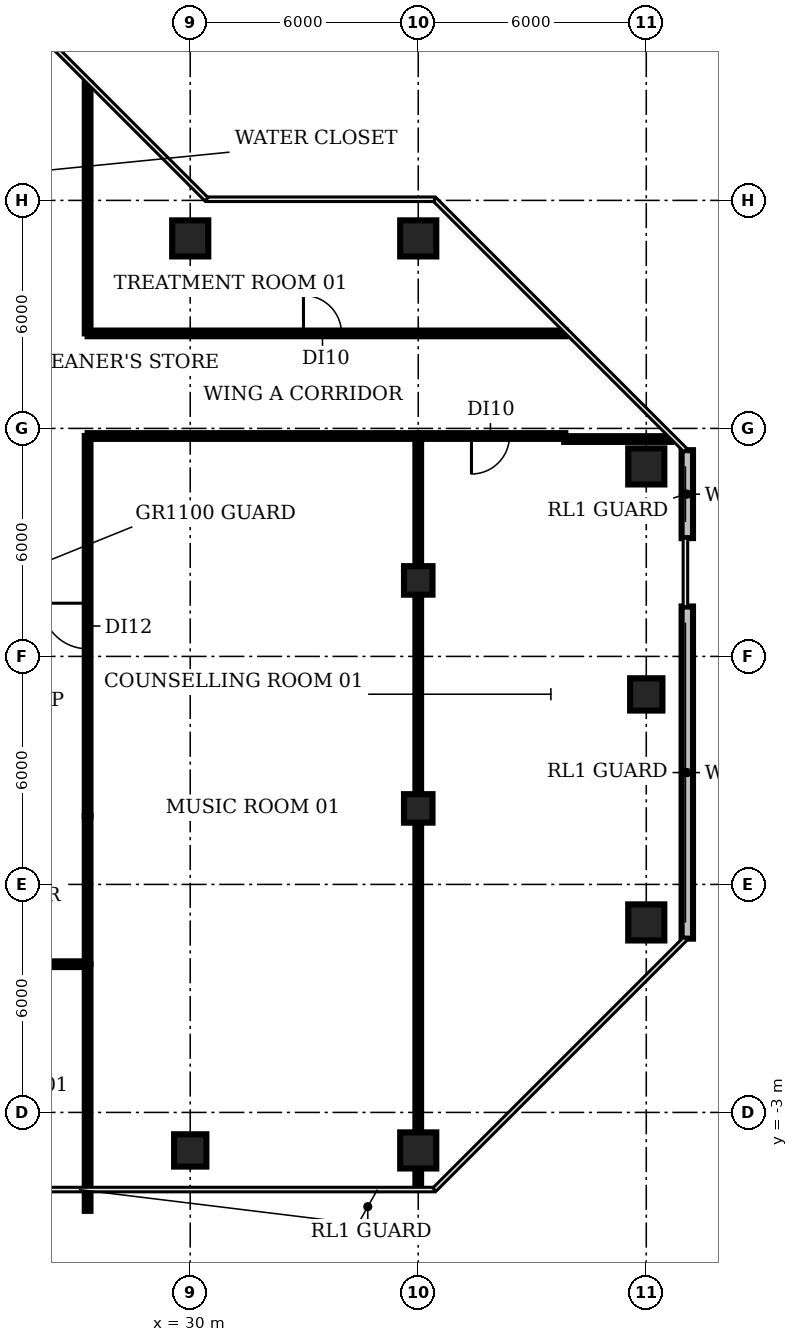
"""IFC4 building model, lengths in metres.
Left out: names, types, materials, properties, quantities, classifications, styles, units other than length and angle.
Written with IfcOpenShell. Run it as: python <this file> out.ifc"""

import sys

from ifc_helpers import new_model, si_unit, direction, frame, frame_2d, origin, origin_2d, place, context, subcontext, project, spatial, rectangle, circle, extrude, element, fill, save


model = new_model("IFC4")
c1 = context("Model", 3, precision=1e-05, world=origin(), true_north=direction((0.0, 1.0)))
c2 = subcontext(c1, "Body", "Model", "MODEL_VIEW")
j1 = project(units=[si_unit("LENGTHUNIT", "METRE"), si_unit("PLANEANGLEUNIT", "RADIAN")], contexts=[c1])
p1 = place(None, origin())
s1 = spatial("IfcSite", under=j1, at=p1, CompositionType="ELEMENT")
p2 = place(p1, origin())
s2 = spatial("IfcBuilding", under=s1, at=p2, CompositionType="ELEMENT")
p3 = place(p2, frame((0.0, 0.0, 155.0)))
s3 = spatial("IfcBuildingStorey", under=s2, at=p3, CompositionType="ELEMENT", Elevation=155.0)
p4 = place(p3, frame((30.0, -4.0, 0.0), z_axis=(0.0, 0.0, 1.0), x_axis=(1.0, 0.0, 0.0)))
e1 = element("IfcColumn", 1, at=p4, inside=s3, PredefinedType="COLUMN", context=c2, shape_type="SweptSolid", body=[
    extrude(rectangle(XDim=0.85, YDim=0.85, at=origin_2d()), origin(), (0.0, 0.0, 1.0), 3.85),
])
for number, where, z_axis, x_axis in (
    (2, (30.0, 20.0, 0.0), (0.0, 0.0, 1.0), (1.0, 0.0, 0.0)),
    (3, (36.0, -4.0, 0.0), (0.0, 0.0, 1.0), (1.0, 0.0, 0.0)),
):
    element("IfcColumn", number, at=place(p3, frame(where, z_axis=z_axis, x_axis=x_axis)), inside=s3, PredefinedType="COLUMN", context=c2, shape_type="SweptSolid", body=[
        extrude(circle(Radius=0.475, at=origin_2d()), origin(), (0.0, 0.0, 1.0), 3.85),
    ])
for number, where, z_axis, x_axis in (
    (4, (36.0, 5.0, 0.0), (0.0, 0.0, 1.0), (1.0, 0.0, 0.0)),
    (5, (36.0, 11.0, 0.0), (0.0, 0.0, 1.0), (1.0, 0.0, 0.0)),
):
    element("IfcColumn", number, at=place(p3, frame(where, z_axis=z_axis, x_axis=x_axis)), inside=s3, PredefinedType="COLUMN", context=c2, shape_type="SweptSolid", body=[
        extrude(rectangle(XDim=0.75, YDim=0.75, at=origin_2d()), origin(), (0.0, 0.0, 1.0), 3.85),
    ])
for number, where, z_axis, x_axis in (
    (6, (36.0, 20.0, 0.0), (0.0, 0.0, 1.0), (1.0, 0.0, 0.0)),
    (7, (42.0, 2.0, 0.0), (0.0, 0.0, 1.0), (1.0, 0.0, 0.0)),
):
    element("IfcColumn", number, at=place(p3, frame(where, z_axis=z_axis, x_axis=x_axis)), inside=s3, PredefinedType="COLUMN", context=c2, shape_type="SweptSolid", body=[
        extrude(circle(Radius=0.475, at=origin_2d()), origin(), (0.0, 0.0, 1.0), 3.85),
    ])
p5 = place(p3, frame((42.0, 8.0, 0.0), z_axis=(0.0, 0.0, 1.0), x_axis=(1.0, 0.0, 0.0)))
e8 = element("IfcColumn", 8, at=p5, inside=s3, PredefinedType="COLUMN", context=c2, shape_type="SweptSolid", body=[
    extrude(rectangle(XDim=0.85, YDim=0.85, at=origin_2d()), origin(), (0.0, 0.0, 1.0), 3.85),
])
p6 = place(p3, frame((42.0, 14.0, 0.0), z_axis=(0.0, 0.0, 1.0), x_axis=(1.0, 0.0, 0.0)))
e9 = element("IfcColumn", 9, at=p6, inside=s3, PredefinedType="COLUMN", context=c2, shape_type="SweptSolid", body=[
    extrude(circle(Radius=0.475, at=origin_2d()), origin(), (0.0, 0.0, 1.0), 3.85),
])
p7 = place(p3, frame((43.08, 1.573, 0.0), z_axis=(0.0, 0.0, 1.0), x_axis=(0.0, 1.0, 0.0)))
e10 = element("IfcWall", 10, at=p7, inside=s3, PredefinedType="SOLIDWALL", context=c2, shape_type="SweptSolid", body=[
    extrude(rectangle(XDim=8.74, YDim=0.3, at=frame_2d((4.37, 0.0))), origin(), (0.0, 0.0, 1.0), 3.85),
])
p8 = place(p3, frame((43.08, 12.113, 0.0), z_axis=(0.0, 0.0, 1.0), x_axis=(0.0, 1.0, 0.0)))
e11 = element("IfcWall", 11, at=p8, inside=s3, PredefinedType="SOLIDWALL", context=c2, shape_type="SweptSolid", body=[
    extrude(rectangle(XDim=2.313, YDim=0.3, at=frame_2d((1.157, 0.0))), origin(), (0.0, 0.0, 1.0), 3.85),
])
p9 = place(p3, frame((27.3, -5.59, 0.0), z_axis=(0.0, 0.0, 1.0), x_axis=(0.0, 1.0, 0.0)))
e12 = element("IfcWall", 12, at=p9, inside=s3, PredefinedType="PARTITIONING", context=c2, shape_type="SweptSolid", body=[
    extrude(rectangle(XDim=6.49, YDim=0.15, at=frame_2d((3.245, 0.0))), origin(), (0.0, 0.0, 1.0), 2.88),
])
p10 = place(p3, frame((27.3, 0.9, 0.0), z_axis=(0.0, 0.0, 1.0), x_axis=(-1.0, 0.0, 0.0)))
e13 = element("IfcWall", 13, at=p10, inside=s3, PredefinedType="PARTITIONING", context=c2, shape_type="SweptSolid", body=[
    extrude(rectangle(XDim=24.6, YDim=0.15, at=frame_2d((12.3, 0.0))), origin(), (0.0, 0.0, 1.0), 2.88),
])
p11 = place(p10, frame((11.8, 0.0, 0.0)))
e14 = element("IfcOpeningElement", 14, at=p11, cuts=e13, PredefinedType="OPENING", context=c2, shape_type="SweptSolid", body=[
    extrude(rectangle(XDim=1.2, YDim=2.1, at=frame_2d((0.6, 1.05))), frame((0.0, 0.085, 0.0), z_axis=(0.0, -1.0, 0.0), x_axis=(1.0, 0.0, 0.0)), (0.0, 0.0, 1.0), 0.17),
])
p12 = place(p3, frame((27.3, 0.9, 0.0), z_axis=(0.0, 0.0, 1.0), x_axis=(0.0, 1.0, 0.0)))
e15 = element("IfcWall", 15, at=p12, inside=s3, PredefinedType="PARTITIONING", context=c2, shape_type="SweptSolid", body=[
    extrude(rectangle(XDim=3.9, YDim=0.15, at=frame_2d((1.95, 0.0))), origin(), (0.0, 0.0, 1.0), 2.88),
])
p13 = place(p3, frame((27.3, 4.8, 0.0), z_axis=(0.0, 0.0, 1.0), x_axis=(0.0, 1.0, 0.0)))
e16 = element("IfcWall", 16, at=p13, inside=s3, PredefinedType="PARTITIONING", context=c2, shape_type="SweptSolid", body=[
    extrude(rectangle(XDim=10.0, YDim=0.15, at=frame_2d((5.0, 0.0))), origin(), (0.0, 0.0, 1.0), 2.88),
])
p14 = place(p13, frame((4.4, 0.0, 0.0)))
e17 = element("IfcOpeningElement", 17, at=p14, cuts=e16, PredefinedType="OPENING", context=c2, shape_type="SweptSolid", body=[
    extrude(rectangle(XDim=1.2, YDim=2.1, at=frame_2d((0.6, 1.05))), frame((0.0, 0.085, 0.0), z_axis=(0.0, -1.0, 0.0), x_axis=(1.0, 0.0, 0.0)), (0.0, 0.0, 1.0), 0.17),
])
p15 = place(p3, frame((27.3, 14.8, 0.0), z_axis=(0.0, 0.0, 1.0), x_axis=(1.0, 0.0, 0.0)))
e18 = element("IfcWall", 18, at=p15, inside=s3, PredefinedType="PARTITIONING", context=c2, shape_type="SweptSolid", body=[
    extrude(rectangle(XDim=8.7, YDim=0.15, at=frame_2d((4.35, 0.0))), origin(), (0.0, 0.0, 1.0), 2.88),
])
p16 = place(p3, frame((27.3, 17.5, 0.0), z_axis=(0.0, 0.0, 1.0), x_axis=(0.0, 1.0, 0.0)))
e19 = element("IfcWall", 19, at=p16, inside=s3, PredefinedType="PARTITIONING", context=c2, shape_type="SweptSolid", body=[
    extrude(rectangle(XDim=6.58, YDim=0.15, at=frame_2d((3.29, 0.0))), origin(), (0.0, 0.0, 1.0), 2.88),
])
p17 = place(p3, frame((27.3, 17.5, 0.0), z_axis=(0.0, 0.0, 1.0), x_axis=(1.0, 0.0, 0.0)))
e20 = element("IfcWall", 20, at=p17, inside=s3, PredefinedType="PARTITIONING", context=c2, shape_type="SweptSolid", body=[
    extrude(rectangle(XDim=12.58, YDim=0.15, at=frame_2d((6.29, 0.0))), origin(), (0.0, 0.0, 1.0), 2.88),
])
p18 = place(p17, frame((5.68, 0.0, 0.0)))
e21 = element("IfcOpeningElement", 21, at=p18, cuts=e20, PredefinedType="OPENING", context=c2, shape_type="SweptSolid", body=[
    extrude(rectangle(XDim=1.0, YDim=2.1, at=frame_2d((0.5, 1.05))), frame((0.0, 0.085, 0.0), z_axis=(0.0, -1.0, 0.0), x_axis=(1.0, 0.0, 0.0)), (0.0, 0.0, 1.0), 0.17),
])
p19 = place(p3, frame((36.0, -4.97, 0.0), z_axis=(0.0, 0.0, 1.0), x_axis=(0.0, 1.0, 0.0)))
e22 = element("IfcWall", 22, at=p19, inside=s3, PredefinedType="PARTITIONING", context=c2, shape_type="SweptSolid", body=[
    extrude(rectangle(XDim=19.77, YDim=0.15, at=frame_2d((9.885, 0.0))), origin(), (0.0, 0.0, 1.0), 2.88),
])
p20 = place(p3, frame((39.84, 14.72, 0.0), z_axis=(0.0, 0.0, 1.0), x_axis=(1.0, 0.0, 0.0)))
e23 = element("IfcWall", 23, at=p20, inside=s3, PredefinedType="PARTITIONING", context=c2, shape_type="SweptSolid", body=[
    extrude(rectangle(XDim=2.812, YDim=0.15, at=frame_2d((1.406, 0.0))), origin(), (0.0, 0.0, 1.0), 2.88),
])
p21 = place(p3, frame((39.87, 14.8, 0.0), z_axis=(0.0, 0.0, 1.0), x_axis=(-1.0, 0.0, 0.0)))
e24 = element("IfcWall", 24, at=p21, inside=s3, PredefinedType="PARTITIONING", context=c2, shape_type="SweptSolid", body=[
    extrude(rectangle(XDim=3.87, YDim=0.15, at=frame_2d((1.935, 0.0))), origin(), (0.0, 0.0, 1.0), 2.88),
])
p22 = place(p21, frame((1.47, 0.0, 0.0)))
e25 = element("IfcOpeningElement", 25, at=p22, cuts=e24, PredefinedType="OPENING", context=c2, shape_type="SweptSolid", body=[
    extrude(rectangle(XDim=1.0, YDim=2.1, at=frame_2d((0.5, 1.05))), frame((0.0, 0.085, 0.0), z_axis=(0.0, -1.0, 0.0), x_axis=(1.0, 0.0, 0.0)), (0.0, 0.0, 1.0), 0.17),
])
p23 = place(p14, origin())
e26 = element("IfcDoor", 26, at=p23, inside=s3, OperationType="SINGLE_SWING_RIGHT", PredefinedType="DOOR", context=c2, shape_type="SweptSolid", body=[
    extrude(rectangle(XDim=1.2, YDim=2.1, at=frame_2d((0.6, 1.05))), frame((0.0, 0.025, 0.0), z_axis=(0.0, -1.0, 0.0), x_axis=(1.0, 0.0, 0.0)), (0.0, 0.0, 1.0), 0.05),
])
fill(e17, e26)
p24 = place(p18, origin())
e27 = element("IfcDoor", 27, at=p24, inside=s3, OperationType="SINGLE_SWING_LEFT", PredefinedType="DOOR", context=c2, shape_type="SweptSolid", body=[
    extrude(rectangle(XDim=1.0, YDim=2.1, at=frame_2d((0.5, 1.05))), frame((0.0, 0.025, 0.0), z_axis=(0.0, -1.0, 0.0), x_axis=(1.0, 0.0, 0.0)), (0.0, 0.0, 1.0), 0.05),
])
fill(e21, e27)
p25 = place(p22, origin())
e28 = element("IfcDoor", 28, at=p25, inside=s3, OperationType="SINGLE_SWING_RIGHT", PredefinedType="DOOR", context=c2, shape_type="SweptSolid", body=[
    extrude(rectangle(XDim=1.0, YDim=2.1, at=frame_2d((0.5, 1.05))), frame((0.0, 0.025, 0.0), z_axis=(0.0, -1.0, 0.0), x_axis=(1.0, 0.0, 0.0)), (0.0, 0.0, 1.0), 0.05),
])
fill(e25, e28)
save(model, sys.argv[1])
